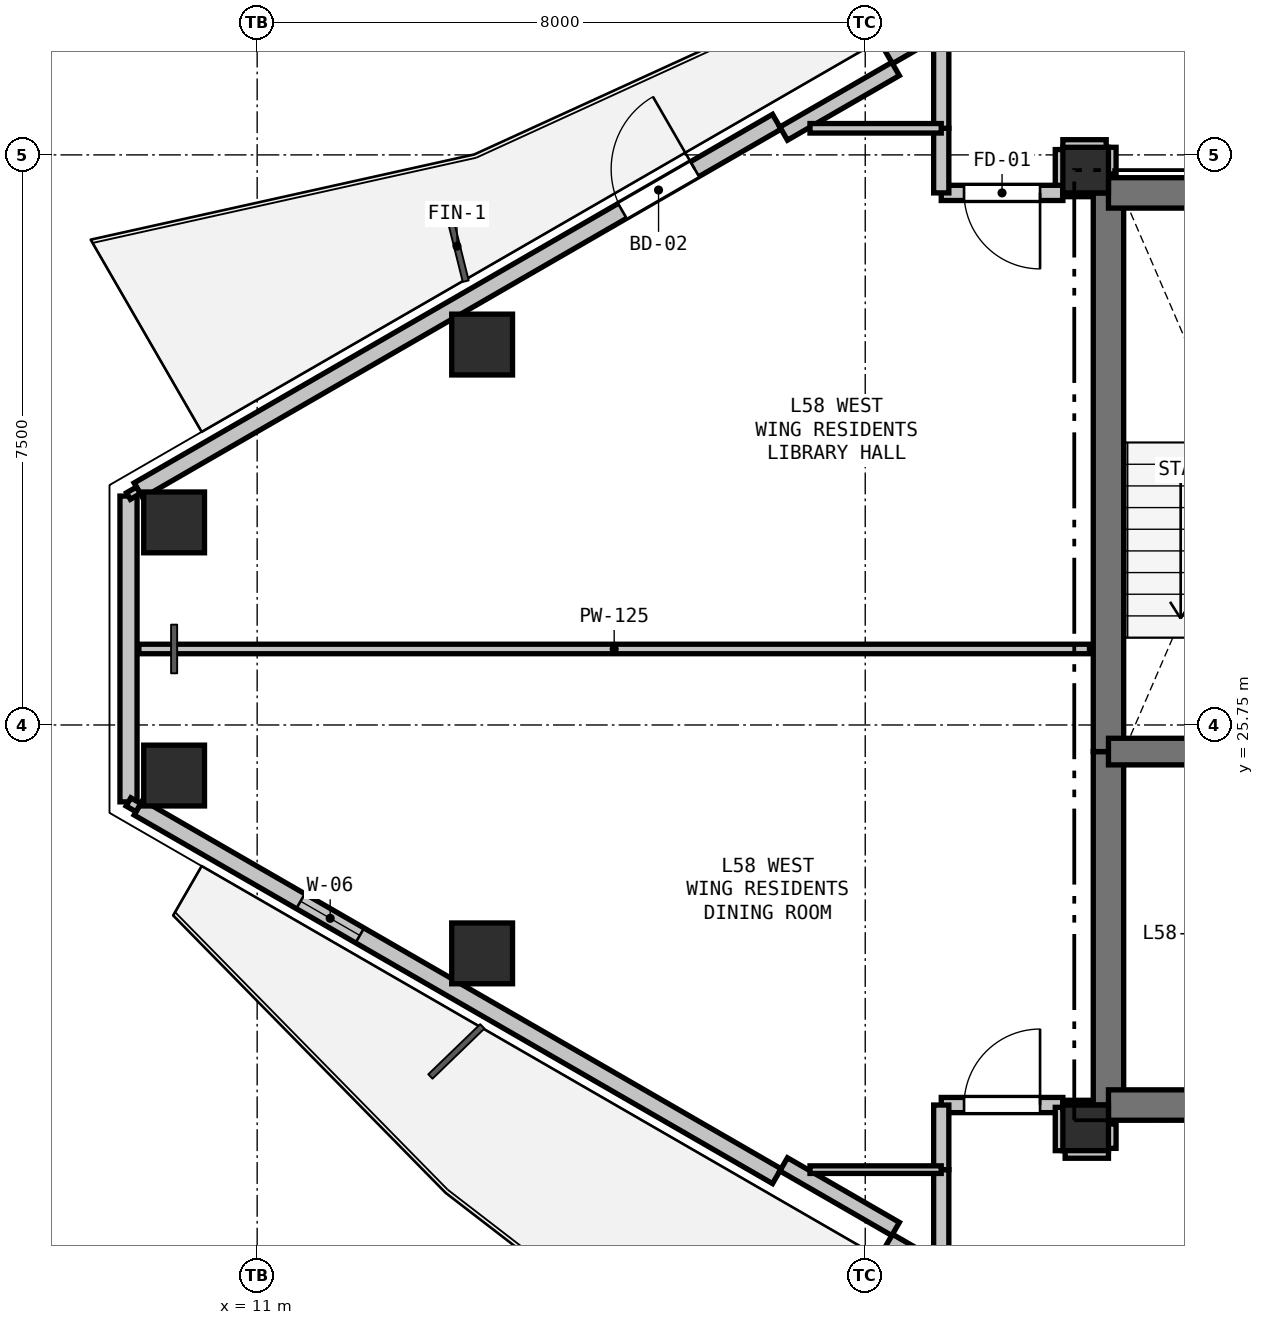
"""IFC4 building model, lengths in metres.
Left out: names, types, materials, properties, quantities, classifications, styles, units other than length and angle.
Written with IfcOpenShell. Run it as: python <this file> out.ifc"""

import sys

from ifc_helpers import new_model, si_unit, direction, frame, frame_2d, origin, origin_2d, place, context, subcontext, project, spatial, rectangle, hollow_rectangle, extrude, element, fill, save


model = new_model("IFC4")
c1 = context("Model", 3, precision=1e-05, world=origin(), true_north=direction((0.0, 1.0)))
c2 = subcontext(c1, "Body", "Model", "MODEL_VIEW")
j1 = project(units=[si_unit("LENGTHUNIT", "METRE"), si_unit("PLANEANGLEUNIT", "RADIAN")], contexts=[c1])
p1 = place(None, origin())
s1 = spatial("IfcSite", under=j1, at=p1, CompositionType="ELEMENT")
p2 = place(p1, origin())
s2 = spatial("IfcBuilding", under=s1, at=p2, CompositionType="ELEMENT")
p3 = place(p2, frame((0.0, 0.0, 208.5)))
s3 = spatial("IfcBuildingStorey", under=s2, at=p3, CompositionType="ELEMENT", Elevation=208.5)
for number, where, z_axis, x_axis in (
    (1, (21.9, 20.45, 0.0), (0.0, 0.0, 1.0), (1.0, 0.0, 0.0)),
    (2, (21.9, 33.05, 0.0), (0.0, 0.0, 1.0), (1.0, 0.0, 0.0)),
):
    element("IfcColumn", number, at=place(p3, frame(where, z_axis=z_axis, x_axis=x_axis)), inside=s3, PredefinedType="COLUMN", context=c2, shape_type="SweptSolid", body=[
        extrude(rectangle(XDim=0.6, YDim=0.6, at=origin_2d()), origin(), (0.0, 0.0, 1.0), 3.3),
    ])
for number, where, z_axis, x_axis in (
    (3, (9.907, 28.415, 0.0), (0.0, 0.0, 1.0), (1.0, 0.0, 0.0)),
    (4, (13.96, 30.755, 0.0), (0.0, 0.0, 1.0), (1.0, 0.0, 0.0)),
    (5, (13.96, 22.745, 0.0), (0.0, 0.0, 1.0), (1.0, 0.0, 0.0)),
    (6, (9.907, 25.085, 0.0), (0.0, 0.0, 1.0), (1.0, 0.0, 0.0)),
):
    element("IfcColumn", number, at=place(p3, frame(where, z_axis=z_axis, x_axis=x_axis)), inside=s3, PredefinedType="COLUMN", context=c2, shape_type="SweptSolid", body=[
        extrude(hollow_rectangle(XDim=0.8, YDim=0.8, WallThickness=0.025, at=origin_2d()), origin(), (0.0, 0.0, 1.0), 3.3),
    ])
p4 = place(p3, frame((9.308, 24.738, 0.0), z_axis=(0.0, 0.0, 1.0), x_axis=(0.0, 1.0, 0.0)))
e7 = element("IfcWall", 7, at=p4, inside=s3, PredefinedType="SOLIDWALL", context=c2, shape_type="SweptSolid", body=[
    extrude(rectangle(XDim=4.023, YDim=0.225, at=frame_2d((2.012, 0.0))), origin(), (0.0, 0.0, 1.0), 2.69),
])
p5 = place(p3, frame((9.438, 28.837, 0.0), z_axis=(0.0, 0.0, 1.0), x_axis=(0.866027133173, 0.499997004599, 0.0)))
e8 = element("IfcWall", 8, at=p5, inside=s3, PredefinedType="SOLIDWALL", context=c2, shape_type="SweptSolid", body=[
    extrude(rectangle(XDim=9.699, YDim=0.225, at=frame_2d((4.849, 0.0))), origin(), (0.0, 0.0, 1.0), 2.69),
])
p6 = place(p5, frame((7.352, 0.0, 0.0)))
e9 = element("IfcOpeningElement", 9, at=p6, cuts=e8, PredefinedType="OPENING", context=c2, shape_type="SweptSolid", body=[
    extrude(rectangle(XDim=1.1, YDim=2.1, at=frame_2d((0.55, 1.05))), frame((0.0, 0.123, 0.0), z_axis=(0.0, -1.0, 0.0), x_axis=(1.0, 0.0, 0.0)), (0.0, 0.0, 1.0), 0.245),
])
p7 = place(p3, frame((19.309, 34.536, 0.0), z_axis=(0.0, 0.0, 1.0), x_axis=(0.866020680503, 0.500008180874, 0.0)))
e10 = element("IfcWall", 10, at=p7, inside=s3, PredefinedType="PARAPET", context=c2, shape_type="SweptSolid", body=[
    extrude(rectangle(XDim=8.999, YDim=0.2, at=frame_2d((4.5, 0.0))), origin(), (0.0, 0.0, 1.0), 0.2),
])
p8 = place(p3, frame((17.927, 33.53, 0.0), z_axis=(0.0, 0.0, 1.0), x_axis=(0.86605165483, 0.499954529098, 0.0)))
e11 = element("IfcWall", 11, at=p8, inside=s3, PredefinedType="PARAPET", context=c2, shape_type="SweptSolid", body=[
    extrude(rectangle(XDim=1.7, YDim=0.2, at=frame_2d((0.85, 0.0))), origin(), (0.0, 0.0, 1.0), 2.69),
])
p9 = place(p3, frame((27.102, 14.464, 0.0), z_axis=(0.0, 0.0, 1.0), x_axis=(-0.866020680503, 0.500008180874, 0.0)))
e12 = element("IfcWall", 12, at=p9, inside=s3, PredefinedType="PARAPET", context=c2, shape_type="SweptSolid", body=[
    extrude(rectangle(XDim=8.999, YDim=0.2, at=frame_2d((4.5, 0.0))), origin(), (0.0, 0.0, 1.0), 0.2),
])
p10 = place(p3, frame((17.837, 19.814, 0.0), z_axis=(0.0, 0.0, 1.0), x_axis=(-0.866027133173, 0.499997004599, 0.0)))
e13 = element("IfcWall", 13, at=p10, inside=s3, PredefinedType="SOLIDWALL", context=c2, shape_type="SweptSolid", body=[
    extrude(rectangle(XDim=9.699, YDim=0.225, at=frame_2d((4.849, 0.0))), origin(), (0.0, 0.0, 1.0), 2.69),
])
p11 = place(p10, frame((6.335, 0.0, 0.9)))
e14 = element("IfcOpeningElement", 14, at=p11, cuts=e13, PredefinedType="OPENING", context=c2, shape_type="SweptSolid", body=[
    extrude(rectangle(XDim=0.9, YDim=1.4, at=frame_2d((0.45, 0.7))), frame((0.0, 0.123, 0.0), z_axis=(0.0, -1.0, 0.0), x_axis=(1.0, 0.0, 0.0)), (0.0, 0.0, 1.0), 0.245),
])
p12 = place(p3, frame((19.399, 19.12, 0.0), z_axis=(0.0, 0.0, 1.0), x_axis=(-0.86605165483, 0.499954529098, 0.0)))
e15 = element("IfcWall", 15, at=p12, inside=s3, PredefinedType="PARAPET", context=c2, shape_type="SweptSolid", body=[
    extrude(rectangle(XDim=1.7, YDim=0.2, at=frame_2d((0.85, 0.0))), origin(), (0.0, 0.0, 1.0), 2.69),
])
p13 = place(p3, frame((22.2, 20.75, 0.0), z_axis=(0.0, 0.0, 1.0), x_axis=(0.0, 1.0, 0.0)))
e16 = element("IfcWall", 16, at=p13, inside=s3, PredefinedType="SHEAR", context=c2, shape_type="SweptSolid", body=[
    extrude(rectangle(XDim=4.65, YDim=0.4, at=frame_2d((2.325, 0.0))), origin(), (0.0, 0.0, 1.0), 3.07),
])
p14 = place(p3, frame((22.2, 25.4, 0.0), z_axis=(0.0, 0.0, 1.0), x_axis=(0.0, 1.0, 0.0)))
e17 = element("IfcWall", 17, at=p14, inside=s3, PredefinedType="SHEAR", context=c2, shape_type="SweptSolid", body=[
    extrude(rectangle(XDim=7.35, YDim=0.4, at=frame_2d((3.675, 0.0))), origin(), (0.0, 0.0, 1.0), 3.07),
])
p15 = place(p3, frame((22.2, 32.75, 0.0), z_axis=(0.0, 0.0, 1.0), x_axis=(1.0, 0.0, 0.0)))
e18 = element("IfcWall", 18, at=p15, inside=s3, PredefinedType="SHEAR", context=c2, shape_type="SweptSolid", body=[
    extrude(rectangle(XDim=3.45, YDim=0.4, at=frame_2d((1.725, 0.0))), origin(), (0.0, 0.0, 1.0), 3.07),
])
p16 = place(p3, frame((25.65, 20.75, 0.0), z_axis=(0.0, 0.0, 1.0), x_axis=(-1.0, 0.0, 0.0)))
e19 = element("IfcWall", 19, at=p16, inside=s3, PredefinedType="SHEAR", context=c2, shape_type="SweptSolid", body=[
    extrude(rectangle(XDim=3.45, YDim=0.4, at=frame_2d((1.725, 0.0))), origin(), (0.0, 0.0, 1.0), 3.07),
])
p17 = place(p16, frame((0.65, 0.0, 0.0)))
e20 = element("IfcOpeningElement", 20, at=p17, cuts=e19, PredefinedType="OPENING", context=c2, shape_type="SweptSolid", body=[
    extrude(rectangle(XDim=1.15, YDim=2.15, at=frame_2d((0.575, 1.075))), frame((0.0, 0.21, 0.0), z_axis=(0.0, -1.0, 0.0), x_axis=(1.0, 0.0, 0.0)), (0.0, 0.0, 1.0), 0.42),
])
p18 = place(p3, frame((22.2, 25.4, 0.0), z_axis=(0.0, 0.0, 1.0), x_axis=(1.0, 0.0, 0.0)))
e21 = element("IfcWall", 21, at=p18, inside=s3, PredefinedType="SHEAR", context=c2, shape_type="SweptSolid", body=[
    extrude(rectangle(XDim=3.45, YDim=0.35, at=frame_2d((1.725, 0.0))), origin(), (0.0, 0.0, 1.0), 3.07),
])
p19 = place(p18, frame((1.15, 0.0, 0.0)))
e22 = element("IfcOpeningElement", 22, at=p19, cuts=e21, PredefinedType="OPENING", context=c2, shape_type="SweptSolid", body=[
    extrude(rectangle(XDim=1.15, YDim=2.15, at=frame_2d((0.575, 1.075))), frame((0.0, 0.185, 0.0), z_axis=(0.0, -1.0, 0.0), x_axis=(1.0, 0.0, 0.0)), (0.0, 0.0, 1.0), 0.37),
])
p20 = place(p3, frame((22.2, 33.0, 0.0), z_axis=(0.0, 0.0, 1.0), x_axis=(0.0, 1.0, 0.0)))
e23 = element("IfcWall", 23, at=p20, inside=s3, PredefinedType="PARTITIONING", context=c2, shape_type="SweptSolid", body=[
    extrude(rectangle(XDim=0.35, YDim=0.2, at=frame_2d((0.175, 0.0))), origin(), (0.0, 0.0, 1.0), 2.595),
])
p21 = place(p3, frame((22.17, 33.35, 0.0), z_axis=(0.0, 0.0, 1.0), x_axis=(-1.0, 0.0, 0.0)))
e24 = element("IfcWall", 24, at=p21, inside=s3, PredefinedType="PARTITIONING", context=c2, shape_type="SweptSolid", body=[
    extrude(rectangle(XDim=0.57, YDim=0.2, at=frame_2d((0.285, 0.0))), origin(), (0.0, 0.0, 1.0), 3.07),
])
p22 = place(p3, frame((21.6, 33.32, 0.0), z_axis=(0.0, 0.0, 1.0), x_axis=(0.0, -1.0, 0.0)))
e25 = element("IfcWall", 25, at=p22, inside=s3, PredefinedType="PARTITIONING", context=c2, shape_type="SweptSolid", body=[
    extrude(rectangle(XDim=0.57, YDim=0.2, at=frame_2d((0.285, 0.0))), origin(), (0.0, 0.0, 1.0), 2.518),
])
p23 = place(p3, frame((21.6, 32.75, 0.0), z_axis=(0.0, 0.0, 1.0), x_axis=(-1.0, 0.0, 0.0)))
e26 = element("IfcWall", 26, at=p23, inside=s3, PredefinedType="PARTITIONING", context=c2, shape_type="SweptSolid", body=[
    extrude(rectangle(XDim=1.6, YDim=0.2, at=frame_2d((0.8, 0.0))), origin(), (0.0, 0.0, 1.0), 2.518),
])
p24 = place(p23, frame((0.3, 0.0, 0.0)))
e27 = element("IfcOpeningElement", 27, at=p24, cuts=e26, PredefinedType="OPENING", context=c2, shape_type="SweptSolid", body=[
    extrude(rectangle(XDim=1.0, YDim=2.15, at=frame_2d((0.5, 1.075))), frame((0.0, 0.11, 0.0), z_axis=(0.0, -1.0, 0.0), x_axis=(1.0, 0.0, 0.0)), (0.0, 0.0, 1.0), 0.22),
])
p25 = place(p3, frame((20.0, 32.75, 0.0), z_axis=(0.0, 0.0, 1.0), x_axis=(0.0, 1.0, 0.0)))
e28 = element("IfcWall", 28, at=p25, inside=s3, PredefinedType="PARTITIONING", context=c2, shape_type="SweptSolid", body=[
    extrude(rectangle(XDim=0.85, YDim=0.2, at=frame_2d((0.425, 0.0))), origin(), (0.0, 0.0, 1.0), 3.07),
])
p26 = place(p3, frame((20.0, 33.6, 0.0), z_axis=(0.0, 0.0, 1.0), x_axis=(0.0, 1.0, 0.0)))
e29 = element("IfcWall", 29, at=p26, inside=s3, PredefinedType="PARTITIONING", context=c2, shape_type="SweptSolid", body=[
    extrude(rectangle(XDim=1.291, YDim=0.2, at=frame_2d((0.646, 0.0))), origin(), (0.0, 0.0, 1.0), 2.365),
])
p27 = place(p3, frame((20.0, 20.75, 0.0), z_axis=(0.0, 0.0, 1.0), x_axis=(1.0, 0.0, 0.0)))
e30 = element("IfcWall", 30, at=p27, inside=s3, PredefinedType="PARTITIONING", context=c2, shape_type="SweptSolid", body=[
    extrude(rectangle(XDim=1.6, YDim=0.2, at=frame_2d((0.8, 0.0))), origin(), (0.0, 0.0, 1.0), 2.518),
])
p28 = place(p27, frame((0.3, 0.0, 0.0)))
e31 = element("IfcOpeningElement", 31, at=p28, cuts=e30, PredefinedType="OPENING", context=c2, shape_type="SweptSolid", body=[
    extrude(rectangle(XDim=1.0, YDim=2.15, at=frame_2d((0.5, 1.075))), frame((0.0, 0.11, 0.0), z_axis=(0.0, -1.0, 0.0), x_axis=(1.0, 0.0, 0.0)), (0.0, 0.0, 1.0), 0.22),
])
for number, where, z_axis, x_axis in (
    (32, (21.6, 20.72, 0.0), (0.0, 0.0, 1.0), (0.0, -1.0, 0.0)),
    (33, (21.63, 20.15, 0.0), (0.0, 0.0, 1.0), (1.0, 0.0, 0.0)),
):
    element("IfcWall", number, at=place(p3, frame(where, z_axis=z_axis, x_axis=x_axis)), inside=s3, PredefinedType="PARTITIONING", context=c2, shape_type="SweptSolid", body=[
        extrude(rectangle(XDim=0.57, YDim=0.2, at=frame_2d((0.285, 0.0))), origin(), (0.0, 0.0, 1.0), 2.518),
    ])
p29 = place(p3, frame((22.2, 20.18, 0.0), z_axis=(0.0, 0.0, 1.0), x_axis=(0.0, 1.0, 0.0)))
e34 = element("IfcWall", 34, at=p29, inside=s3, PredefinedType="PARTITIONING", context=c2, shape_type="SweptSolid", body=[
    extrude(rectangle(XDim=0.32, YDim=0.2, at=frame_2d((0.16, 0.0))), origin(), (0.0, 0.0, 1.0), 2.518),
])
p30 = place(p3, frame((20.0, 18.609, 0.0), z_axis=(0.0, 0.0, 1.0), x_axis=(0.0, 1.0, 0.0)))
e35 = element("IfcWall", 35, at=p30, inside=s3, PredefinedType="PARTITIONING", context=c2, shape_type="SweptSolid", body=[
    extrude(rectangle(XDim=1.291, YDim=0.2, at=frame_2d((0.646, 0.0))), origin(), (0.0, 0.0, 1.0), 2.365),
])
p31 = place(p3, frame((20.0, 19.9, 0.0), z_axis=(0.0, 0.0, 1.0), x_axis=(0.0, 1.0, 0.0)))
e36 = element("IfcWall", 36, at=p31, inside=s3, PredefinedType="PARTITIONING", context=c2, shape_type="SweptSolid", body=[
    extrude(rectangle(XDim=0.85, YDim=0.2, at=frame_2d((0.425, 0.0))), origin(), (0.0, 0.0, 1.0), 3.07),
])
p32 = place(p3, frame((18.273, 33.6, 0.0), z_axis=(0.0, 0.0, 1.0), x_axis=(1.0, 0.0, 0.0)))
e37 = element("IfcWall", 37, at=p32, inside=s3, PredefinedType="PARTITIONING", context=c2, shape_type="SweptSolid", body=[
    extrude(rectangle(XDim=1.727, YDim=0.125, at=frame_2d((0.863, 0.0))), origin(), (0.0, 0.0, 1.0), 2.365),
])
p33 = place(p3, frame((21.6, 32.75, 0.0), z_axis=(0.0, 0.0, 1.0), x_axis=(1.0, 0.0, 0.0)))
e38 = element("IfcWall", 38, at=p33, inside=s3, PredefinedType="PARTITIONING", context=c2, shape_type="SweptSolid", body=[
    extrude(rectangle(XDim=0.35, YDim=0.1, at=frame_2d((0.175, 0.0))), origin(), (0.0, 0.0, 1.0), 2.595),
])
p34 = place(p3, frame((21.95, 26.75, 0.0), z_axis=(0.0, 0.0, 1.0), x_axis=(-1.0, 0.0, 0.0)))
e39 = element("IfcWall", 39, at=p34, inside=s3, PredefinedType="PARTITIONING", context=c2, shape_type="SweptSolid", body=[
    extrude(rectangle(XDim=12.506, YDim=0.125, at=frame_2d((6.253, 0.0))), origin(), (0.0, 0.0, 1.0), 2.595),
])
p35 = place(p3, frame((9.307, 28.762, 0.0), z_axis=(0.0, 0.0, 1.0), x_axis=(0.866239593359, 0.499628829129, 0.0)))
e40 = element("IfcWall", 40, at=p35, inside=s3, PredefinedType="PARTITIONING", context=c2, shape_type="SweptSolid", body=[
    extrude(rectangle(XDim=0.15, YDim=0.1, at=frame_2d((0.075, 0.0))), origin(), (0.0, 0.0, 1.0), 3.07),
])
p36 = place(p3, frame((21.95, 20.75, 0.0), z_axis=(0.0, 0.0, 1.0), x_axis=(-1.0, 0.0, 0.0)))
e41 = element("IfcWall", 41, at=p36, inside=s3, PredefinedType="PARTITIONING", context=c2, shape_type="SweptSolid", body=[
    extrude(rectangle(XDim=0.35, YDim=0.125, at=frame_2d((0.175, 0.0))), origin(), (0.0, 0.0, 1.0), 2.595),
])
p37 = place(p3, frame((20.0, 19.9, 0.0), z_axis=(0.0, 0.0, 1.0), x_axis=(-1.0, 0.0, 0.0)))
e42 = element("IfcWall", 42, at=p37, inside=s3, PredefinedType="PARTITIONING", context=c2, shape_type="SweptSolid", body=[
    extrude(rectangle(XDim=1.727, YDim=0.1, at=frame_2d((0.863, 0.0))), origin(), (0.0, 0.0, 1.0), 2.365),
])
p38 = place(p3, frame((9.437, 24.663, 0.0), z_axis=(0.0, 0.0, 1.0), x_axis=(-0.866239593359, 0.499628829129, 0.0)))
e43 = element("IfcWall", 43, at=p38, inside=s3, PredefinedType="PARTITIONING", context=c2, shape_type="SweptSolid", body=[
    extrude(rectangle(XDim=0.15, YDim=0.125, at=frame_2d((0.075, 0.0))), origin(), (0.0, 0.0, 1.0), 3.07),
])
p39 = place(p6, origin())
e44 = element("IfcDoor", 44, at=p39, inside=s3, OperationType="SINGLE_SWING_RIGHT", PredefinedType="DOOR", context=c2, shape_type="SweptSolid", body=[
    extrude(rectangle(XDim=1.1, YDim=2.1, at=frame_2d((0.55, 1.05))), frame((0.0, 0.025, 0.0), z_axis=(0.0, -1.0, 0.0), x_axis=(1.0, 0.0, 0.0)), (0.0, 0.0, 1.0), 0.05),
])
fill(e9, e44)
p40 = place(p11, origin())
e45 = element("IfcWindow", 45, at=p40, inside=s3, PartitioningType="SINGLE_PANEL", PredefinedType="WINDOW", context=c2, shape_type="SweptSolid", body=[
    extrude(rectangle(XDim=0.9, YDim=1.4, at=frame_2d((0.45, 0.7))), frame((0.0, 0.03, 0.0), z_axis=(0.0, -1.0, 0.0), x_axis=(1.0, 0.0, 0.0)), (0.0, 0.0, 1.0), 0.06),
])
fill(e14, e45)
p41 = place(p24, origin())
e46 = element("IfcDoor", 46, at=p41, inside=s3, OperationType="SINGLE_SWING_LEFT", PredefinedType="DOOR", context=c2, shape_type="SweptSolid", body=[
    extrude(rectangle(XDim=1.0, YDim=2.15, at=frame_2d((0.5, 1.075))), frame((0.0, 0.025, 0.0), z_axis=(0.0, -1.0, 0.0), x_axis=(1.0, 0.0, 0.0)), (0.0, 0.0, 1.0), 0.05),
])
fill(e27, e46)
p42 = place(p28, origin())
e47 = element("IfcDoor", 47, at=p42, inside=s3, OperationType="SINGLE_SWING_RIGHT", PredefinedType="DOOR", context=c2, shape_type="SweptSolid", body=[
    extrude(rectangle(XDim=1.0, YDim=2.15, at=frame_2d((0.5, 1.075))), frame((0.0, 0.025, 0.0), z_axis=(0.0, -1.0, 0.0), x_axis=(1.0, 0.0, 0.0)), (0.0, 0.0, 1.0), 0.05),
])
fill(e31, e47)
save(model, sys.argv[1])
